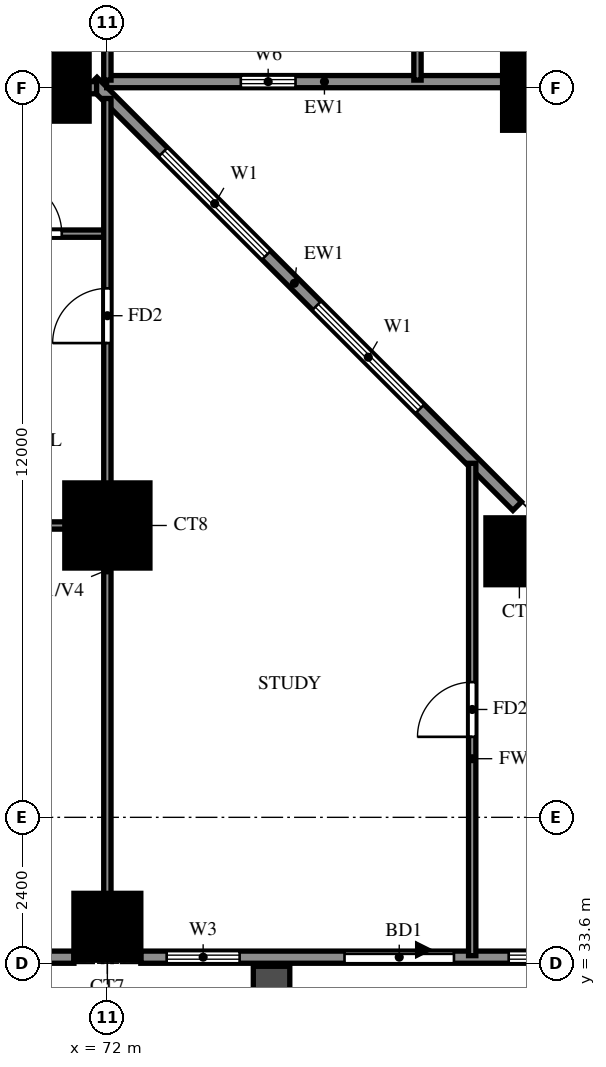
"""IFC4 building model, lengths in metres.
Left out: names, types, materials, properties, quantities, classifications, styles, units other than length and angle.
Written with IfcOpenShell. Run it as: python <this file> out.ifc"""

import sys

from ifc_helpers import new_model, si_unit, direction, frame, frame_2d, origin, origin_2d, place, context, subcontext, project, spatial, rectangle, extrude, source, transform, mapped, element, fill, save


model = new_model("IFC4")
c1 = context("Model", 3, precision=1e-05, world=origin(), true_north=direction((0.0, 1.0)))
c2 = subcontext(c1, "Body", "Model", "MODEL_VIEW")
j1 = project(units=[si_unit("LENGTHUNIT", "METRE"), si_unit("PLANEANGLEUNIT", "RADIAN")], contexts=[c1])
p1 = place(None, origin())
s1 = spatial("IfcSite", under=j1, at=p1, CompositionType="ELEMENT")
p2 = place(p1, origin())
s2 = spatial("IfcBuilding", under=s1, at=p2, CompositionType="ELEMENT")
p3 = place(p2, frame((0.0, 0.0, 58.5)))
s3 = spatial("IfcBuildingStorey", under=s2, at=p3, CompositionType="ELEMENT", Elevation=58.5)
m1 = source(origin(), c2, "Body", "SweptSolid", [
    extrude(rectangle(XDim=1.1, YDim=1.1, at=origin_2d()), origin(), (0.0, 0.0, 1.0), 3.18),
])
for number, where, z_axis, x_axis in (
    (1, (72.0, 34.2, 0.0), (0.0, 0.0, 1.0), (1.0, 0.0, 0.0)),
    (2, (78.776, 40.376, 0.0), (0.0, 0.0, 1.0), (1.0, 0.0, 0.0)),
):
    element("IfcColumn", number, at=place(p3, frame(where, z_axis=z_axis, x_axis=x_axis)), inside=s3, PredefinedType="COLUMN", context=c2, shape_type="MappedRepresentation", body=[
        mapped(m1, transform((0.0, 0.0, 0.0))),
    ])
m2 = source(origin(), c2, "Body", "SweptSolid", [
    extrude(rectangle(XDim=1.4, YDim=1.4, at=origin_2d()), origin(), (0.0, 0.0, 1.0), 3.18),
])
p4 = place(p3, frame((72.0, 40.8, 0.0), z_axis=(0.0, 0.0, 1.0), x_axis=(1.0, 0.0, 0.0)))
e3 = element("IfcColumn", 3, at=p4, inside=s3, PredefinedType="COLUMN", context=c2, shape_type="MappedRepresentation", body=[
    mapped(m2, transform((0.0, 0.0, 0.0))),
])
p5 = place(p3, frame((71.15, 48.0, 0.0), z_axis=(0.0, 0.0, 1.0), x_axis=(1.0, 0.0, 0.0)))
e4 = element("IfcColumn", 4, at=p5, inside=s3, PredefinedType="COLUMN", context=c2, shape_type="MappedRepresentation", body=[
    mapped(m1, transform((0.0, 0.0, 0.0))),
])
p6 = place(p3, frame((79.2, 48.0, 0.0), z_axis=(0.0, 0.0, 1.0), x_axis=(1.0, 0.0, 0.0)))
e5 = element("IfcColumn", 5, at=p6, inside=s3, PredefinedType="COLUMN", context=c2, shape_type="MappedRepresentation", body=[
    mapped(m2, transform((0.0, 0.0, 0.0))),
])
p7 = place(p3, frame((78.74, 41.118, 0.0), z_axis=(0.0, 0.0, 1.0), x_axis=(-0.707106781187, 0.707106781187, 0.0)))
e6 = element("IfcWall", 6, at=p7, inside=s3, PredefinedType="SOLIDWALL", context=c2, shape_type="SweptSolid", body=[
    extrude(rectangle(XDim=9.874, YDim=0.2, at=frame_2d((4.937, 0.0))), origin(), (0.0, 0.0, 1.0), 3.18),
])
p8 = place(p7, frame((2.264, 0.0, 0.6)))
e7 = element("IfcOpeningElement", 7, at=p8, cuts=e6, PredefinedType="OPENING", context=c2, shape_type="SweptSolid", body=[
    extrude(rectangle(XDim=2.4, YDim=2.4, at=frame_2d((1.2, 1.2))), frame((0.0, 0.11, 0.0), z_axis=(0.0, -1.0, 0.0), x_axis=(1.0, 0.0, 0.0)), (0.0, 0.0, 1.0), 0.22),
])
p9 = place(p7, frame((5.836, 0.0, 0.6)))
e8 = element("IfcOpeningElement", 8, at=p9, cuts=e6, PredefinedType="OPENING", context=c2, shape_type="SweptSolid", body=[
    extrude(rectangle(XDim=2.4, YDim=2.4, at=frame_2d((1.2, 1.2))), frame((0.0, 0.11, 0.0), z_axis=(0.0, -1.0, 0.0), x_axis=(1.0, 0.0, 0.0)), (0.0, 0.0, 1.0), 0.22),
])
p10 = place(p3, frame((71.989, 48.1, 0.0), z_axis=(0.0, 0.0, 1.0), x_axis=(1.0, 0.0, 0.0)))
e9 = element("IfcWall", 9, at=p10, inside=s3, PredefinedType="SOLIDWALL", context=c2, shape_type="SweptSolid", body=[
    extrude(rectangle(XDim=6.511, YDim=0.2, at=frame_2d((3.256, 0.0))), origin(), (0.0, 0.0, 1.0), 3.18),
])
p11 = place(p10, frame((2.206, 0.0, 1.5)))
e10 = element("IfcOpeningElement", 10, at=p11, cuts=e9, PredefinedType="OPENING", context=c2, shape_type="SweptSolid", body=[
    extrude(rectangle(XDim=0.9, YDim=0.9, at=frame_2d((0.45, 0.45))), frame((0.0, 0.11, 0.0), z_axis=(0.0, -1.0, 0.0), x_axis=(1.0, 0.0, 0.0)), (0.0, 0.0, 1.0), 0.22),
])
p12 = place(p3, frame((65.35, 33.7, 0.0), z_axis=(0.0, 0.0, 1.0), x_axis=(1.0, 0.0, 0.0)))
e11 = element("IfcWall", 11, at=p12, inside=s3, PredefinedType="SOLIDWALL", context=c2, shape_type="SweptSolid", body=[
    extrude(rectangle(XDim=6.1, YDim=0.2, at=frame_2d((3.05, 0.0))), origin(), (0.0, 0.0, 1.0), 3.18),
])
p13 = place(p12, frame((3.575, 0.0, 0.6)))
e12 = element("IfcOpeningElement", 12, at=p13, cuts=e11, PredefinedType="OPENING", context=c2, shape_type="SweptSolid", body=[
    extrude(rectangle(XDim=1.8, YDim=2.4, at=frame_2d((0.9, 1.2))), frame((0.0, 0.11, 0.0), z_axis=(0.0, -1.0, 0.0), x_axis=(1.0, 0.0, 0.0)), (0.0, 0.0, 1.0), 0.22),
])
p14 = place(p12, frame((2.0, 0.0, 0.6)))
e13 = element("IfcOpeningElement", 13, at=p14, cuts=e11, PredefinedType="OPENING", context=c2, shape_type="SweptSolid", body=[
    extrude(rectangle(XDim=0.9, YDim=2.4, at=frame_2d((0.45, 1.2))), frame((0.0, 0.11, 0.0), z_axis=(0.0, -1.0, 0.0), x_axis=(1.0, 0.0, 0.0)), (0.0, 0.0, 1.0), 0.22),
])
p15 = place(p3, frame((72.55, 33.7, 0.0), z_axis=(0.0, 0.0, 1.0), x_axis=(1.0, 0.0, 0.0)))
e14 = element("IfcWall", 14, at=p15, inside=s3, PredefinedType="SOLIDWALL", context=c2, shape_type="SweptSolid", body=[
    extrude(rectangle(XDim=13.609, YDim=0.2, at=frame_2d((6.804, 0.0))), origin(), (0.0, 0.0, 1.0), 3.18),
])
p16 = place(p15, frame((3.35, 0.0, 0.0)))
e15 = element("IfcOpeningElement", 15, at=p16, cuts=e14, PredefinedType="OPENING", context=c2, shape_type="SweptSolid", body=[
    extrude(rectangle(XDim=1.8, YDim=2.4, at=frame_2d((0.9, 1.2))), frame((0.0, 0.11, 0.0), z_axis=(0.0, -1.0, 0.0), x_axis=(1.0, 0.0, 0.0)), (0.0, 0.0, 1.0), 0.22),
])
p17 = place(p15, frame((0.425, 0.0, 0.6)))
e16 = element("IfcOpeningElement", 16, at=p17, cuts=e14, PredefinedType="OPENING", context=c2, shape_type="SweptSolid", body=[
    extrude(rectangle(XDim=1.2, YDim=2.4, at=frame_2d((0.6, 1.2))), frame((0.0, 0.11, 0.0), z_axis=(0.0, -1.0, 0.0), x_axis=(1.0, 0.0, 0.0)), (0.0, 0.0, 1.0), 0.22),
])
p18 = place(p15, frame((6.05, 0.0, 0.6)))
e17 = element("IfcOpeningElement", 17, at=p18, cuts=e14, PredefinedType="OPENING", context=c2, shape_type="SweptSolid", body=[
    extrude(rectangle(XDim=1.8, YDim=2.4, at=frame_2d((0.9, 1.2))), frame((0.0, 0.11, 0.0), z_axis=(0.0, -1.0, 0.0), x_axis=(1.0, 0.0, 0.0)), (0.0, 0.0, 1.0), 0.22),
])
p19 = place(p15, frame((10.029, 0.0, 0.6)))
e18 = element("IfcOpeningElement", 18, at=p19, cuts=e14, PredefinedType="OPENING", context=c2, shape_type="SweptSolid", body=[
    extrude(rectangle(XDim=2.4, YDim=2.4, at=frame_2d((1.2, 1.2))), frame((0.0, 0.11, 0.0), z_axis=(0.0, -1.0, 0.0), x_axis=(1.0, 0.0, 0.0)), (0.0, 0.0, 1.0), 0.22),
])
p20 = place(p3, frame((74.7, 33.55, 0.0), z_axis=(0.0, 0.0, 1.0), x_axis=(0.0, -1.0, 0.0)))
e19 = element("IfcWall", 19, at=p20, inside=s3, PredefinedType="SOLIDWALL", context=c2, shape_type="SweptSolid", body=[
    extrude(rectangle(XDim=2.65, YDim=0.6, at=frame_2d((1.325, 0.0))), origin(), (0.0, 0.0, 1.0), 2.85),
])
p21 = place(p3, frame((67.2, 48.0, 0.0), z_axis=(0.0, 0.0, 1.0), x_axis=(1.0, 0.0, 0.0)))
e20 = element("IfcWall", 20, at=p21, inside=s3, PredefinedType="SOLIDWALL", context=c2, shape_type="SweptSolid", body=[
    extrude(rectangle(XDim=4.623, YDim=0.2, at=frame_2d((2.312, 0.0))), origin(), (0.0, 0.0, 1.0), 3.18),
])
p22 = place(p3, frame((60.0, 40.8, 0.0), z_axis=(0.0, 0.0, 1.0), x_axis=(1.0, 0.0, 0.0)))
e21 = element("IfcWall", 21, at=p22, inside=s3, PredefinedType="PARTITIONING", context=c2, shape_type="SweptSolid", body=[
    extrude(rectangle(XDim=12.0, YDim=0.12, at=frame_2d((6.0, 0.0))), origin(), (0.0, 0.0, 1.0), 3.18),
])
p23 = place(p22, frame((9.75, 0.0, 0.0)))
e22 = element("IfcOpeningElement", 22, at=p23, cuts=e21, PredefinedType="OPENING", context=c2, shape_type="SweptSolid", body=[
    extrude(rectangle(XDim=0.9, YDim=2.1, at=frame_2d((0.45, 1.05))), frame((0.0, 0.07, 0.0), z_axis=(0.0, -1.0, 0.0), x_axis=(1.0, 0.0, 0.0)), (0.0, 0.0, 1.0), 0.14),
])
p24 = place(p22, frame((2.55, 0.0, 0.0)))
e23 = element("IfcOpeningElement", 23, at=p24, cuts=e21, PredefinedType="OPENING", context=c2, shape_type="SweptSolid", body=[
    extrude(rectangle(XDim=1.5, YDim=2.1, at=frame_2d((0.75, 1.05))), frame((0.0, 0.07, 0.0), z_axis=(0.0, -1.0, 0.0), x_axis=(1.0, 0.0, 0.0)), (0.0, 0.0, 1.0), 0.14),
])
p25 = place(p3, frame((67.2, 45.6, 0.0), z_axis=(0.0, 0.0, 1.0), x_axis=(1.0, 0.0, 0.0)))
e24 = element("IfcWall", 24, at=p25, inside=s3, PredefinedType="PARTITIONING", context=c2, shape_type="SweptSolid", body=[
    extrude(rectangle(XDim=4.8, YDim=0.12, at=frame_2d((2.4, 0.0))), origin(), (0.0, 0.0, 1.0), 3.18),
])
p26 = place(p25, frame((3.15, 0.0, 0.0)))
e25 = element("IfcOpeningElement", 25, at=p26, cuts=e24, PredefinedType="OPENING", context=c2, shape_type="SweptSolid", body=[
    extrude(rectangle(XDim=0.9, YDim=2.1, at=frame_2d((0.45, 1.05))), frame((0.0, 0.07, 0.0), z_axis=(0.0, -1.0, 0.0), x_axis=(1.0, 0.0, 0.0)), (0.0, 0.0, 1.0), 0.14),
])
p27 = place(p3, frame((72.0, 33.725, 0.0), z_axis=(0.0, 0.0, 1.0), x_axis=(0.0, 1.0, 0.0)))
e26 = element("IfcWall", 26, at=p27, inside=s3, PredefinedType="PARTITIONING", context=c2, shape_type="SweptSolid", body=[
    extrude(rectangle(XDim=14.098, YDim=0.12, at=frame_2d((7.049, 0.0))), origin(), (0.0, 0.0, 1.0), 2.28),
])
p28 = place(p27, frame((10.075, 0.0, 0.0)))
e27 = element("IfcOpeningElement", 27, at=p28, cuts=e26, PredefinedType="OPENING", context=c2, shape_type="SweptSolid", body=[
    extrude(rectangle(XDim=0.9, YDim=2.1, at=frame_2d((0.45, 1.05))), frame((0.0, 0.07, 0.0), z_axis=(0.0, -1.0, 0.0), x_axis=(1.0, 0.0, 0.0)), (0.0, 0.0, 1.0), 0.14),
])
for number, where, z_axis, x_axis in (
    (28, (72.0, 48.125, 0.0), (0.0, 0.0, 1.0), (0.0, 1.0, 0.0)),
    (29, (77.1, 48.125, 0.0), (0.0, 0.0, 1.0), (0.0, 1.0, 0.0)),
):
    element("IfcWall", number, at=place(p3, frame(where, z_axis=z_axis, x_axis=x_axis)), inside=s3, PredefinedType="PARTITIONING", context=c2, shape_type="SweptSolid", body=[
        extrude(rectangle(XDim=3.475, YDim=0.12, at=frame_2d((1.738, 0.0))), origin(), (0.0, 0.0, 1.0), 3.18),
    ])
p29 = place(p3, frame((78.0, 33.725, 0.0), z_axis=(0.0, 0.0, 1.0), x_axis=(0.0, 1.0, 0.0)))
e30 = element("IfcWall", 30, at=p29, inside=s3, PredefinedType="PARTITIONING", context=c2, shape_type="SweptSolid", body=[
    extrude(rectangle(XDim=8.098, YDim=0.12, at=frame_2d((4.049, 0.0))), origin(), (0.0, 0.0, 1.0), 2.28),
])
p30 = place(p29, frame((3.599, 0.0, 0.0)))
e31 = element("IfcOpeningElement", 31, at=p30, cuts=e30, PredefinedType="OPENING", context=c2, shape_type="SweptSolid", body=[
    extrude(rectangle(XDim=0.9, YDim=2.1, at=frame_2d((0.45, 1.05))), frame((0.0, 0.07, 0.0), z_axis=(0.0, -1.0, 0.0), x_axis=(1.0, 0.0, 0.0)), (0.0, 0.0, 1.0), 0.14),
])
p31 = place(p8, origin())
e32 = element("IfcWindow", 32, at=p31, inside=s3, PartitioningType="DOUBLE_PANEL_VERTICAL", PredefinedType="WINDOW", context=c2, shape_type="SweptSolid", body=[
    extrude(rectangle(XDim=2.4, YDim=2.4, at=frame_2d((1.2, 1.2))), frame((0.0, 0.03, 0.0), z_axis=(0.0, -1.0, 0.0), x_axis=(1.0, 0.0, 0.0)), (0.0, 0.0, 1.0), 0.06),
])
fill(e7, e32)
p32 = place(p9, origin())
e33 = element("IfcWindow", 33, at=p32, inside=s3, PartitioningType="DOUBLE_PANEL_VERTICAL", PredefinedType="WINDOW", context=c2, shape_type="SweptSolid", body=[
    extrude(rectangle(XDim=2.4, YDim=2.4, at=frame_2d((1.2, 1.2))), frame((0.0, 0.03, 0.0), z_axis=(0.0, -1.0, 0.0), x_axis=(1.0, 0.0, 0.0)), (0.0, 0.0, 1.0), 0.06),
])
fill(e8, e33)
p33 = place(p11, origin())
e34 = element("IfcWindow", 34, at=p33, inside=s3, PartitioningType="SINGLE_PANEL", PredefinedType="WINDOW", context=c2, shape_type="SweptSolid", body=[
    extrude(rectangle(XDim=0.9, YDim=0.9, at=frame_2d((0.45, 0.45))), frame((0.0, 0.03, 0.0), z_axis=(0.0, -1.0, 0.0), x_axis=(1.0, 0.0, 0.0)), (0.0, 0.0, 1.0), 0.06),
])
fill(e10, e34)
p34 = place(p16, origin())
e35 = element("IfcDoor", 35, at=p34, inside=s3, OperationType="DOUBLE_DOOR_SLIDING", PredefinedType="DOOR", context=c2, shape_type="SweptSolid", body=[
    extrude(rectangle(XDim=1.8, YDim=2.4, at=frame_2d((0.9, 1.2))), frame((0.0, 0.025, 0.0), z_axis=(0.0, -1.0, 0.0), x_axis=(1.0, 0.0, 0.0)), (0.0, 0.0, 1.0), 0.05),
])
fill(e15, e35)
p35 = place(p17, origin())
e36 = element("IfcWindow", 36, at=p35, inside=s3, PartitioningType="SINGLE_PANEL", PredefinedType="WINDOW", context=c2, shape_type="SweptSolid", body=[
    extrude(rectangle(XDim=1.2, YDim=2.4, at=frame_2d((0.6, 1.2))), frame((0.0, 0.03, 0.0), z_axis=(0.0, -1.0, 0.0), x_axis=(1.0, 0.0, 0.0)), (0.0, 0.0, 1.0), 0.06),
])
fill(e16, e36)
p36 = place(p18, origin())
e37 = element("IfcWindow", 37, at=p36, inside=s3, PartitioningType="DOUBLE_PANEL_VERTICAL", PredefinedType="WINDOW", context=c2, shape_type="SweptSolid", body=[
    extrude(rectangle(XDim=1.8, YDim=2.4, at=frame_2d((0.9, 1.2))), frame((0.0, 0.03, 0.0), z_axis=(0.0, -1.0, 0.0), x_axis=(1.0, 0.0, 0.0)), (0.0, 0.0, 1.0), 0.06),
])
fill(e17, e37)
p37 = place(p26, origin())
e38 = element("IfcDoor", 38, at=p37, inside=s3, OperationType="SINGLE_SWING_RIGHT", PredefinedType="DOOR", context=c2, shape_type="SweptSolid", body=[
    extrude(rectangle(XDim=0.9, YDim=2.1, at=frame_2d((0.45, 1.05))), frame((0.0, 0.025, 0.0), z_axis=(0.0, -1.0, 0.0), x_axis=(1.0, 0.0, 0.0)), (0.0, 0.0, 1.0), 0.05),
])
fill(e25, e38)
p38 = place(p28, origin())
e39 = element("IfcDoor", 39, at=p38, inside=s3, OperationType="SINGLE_SWING_LEFT", PredefinedType="DOOR", context=c2, shape_type="SweptSolid", body=[
    extrude(rectangle(XDim=0.9, YDim=2.1, at=frame_2d((0.45, 1.05))), frame((0.0, 0.025, 0.0), z_axis=(0.0, -1.0, 0.0), x_axis=(1.0, 0.0, 0.0)), (0.0, 0.0, 1.0), 0.05),
])
fill(e27, e39)
p39 = place(p30, origin())
e40 = element("IfcDoor", 40, at=p39, inside=s3, OperationType="SINGLE_SWING_LEFT", PredefinedType="DOOR", context=c2, shape_type="SweptSolid", body=[
    extrude(rectangle(XDim=0.9, YDim=2.1, at=frame_2d((0.45, 1.05))), frame((0.0, 0.025, 0.0), z_axis=(0.0, -1.0, 0.0), x_axis=(1.0, 0.0, 0.0)), (0.0, 0.0, 1.0), 0.05),
])
fill(e31, e40)
save(model, sys.argv[1])
